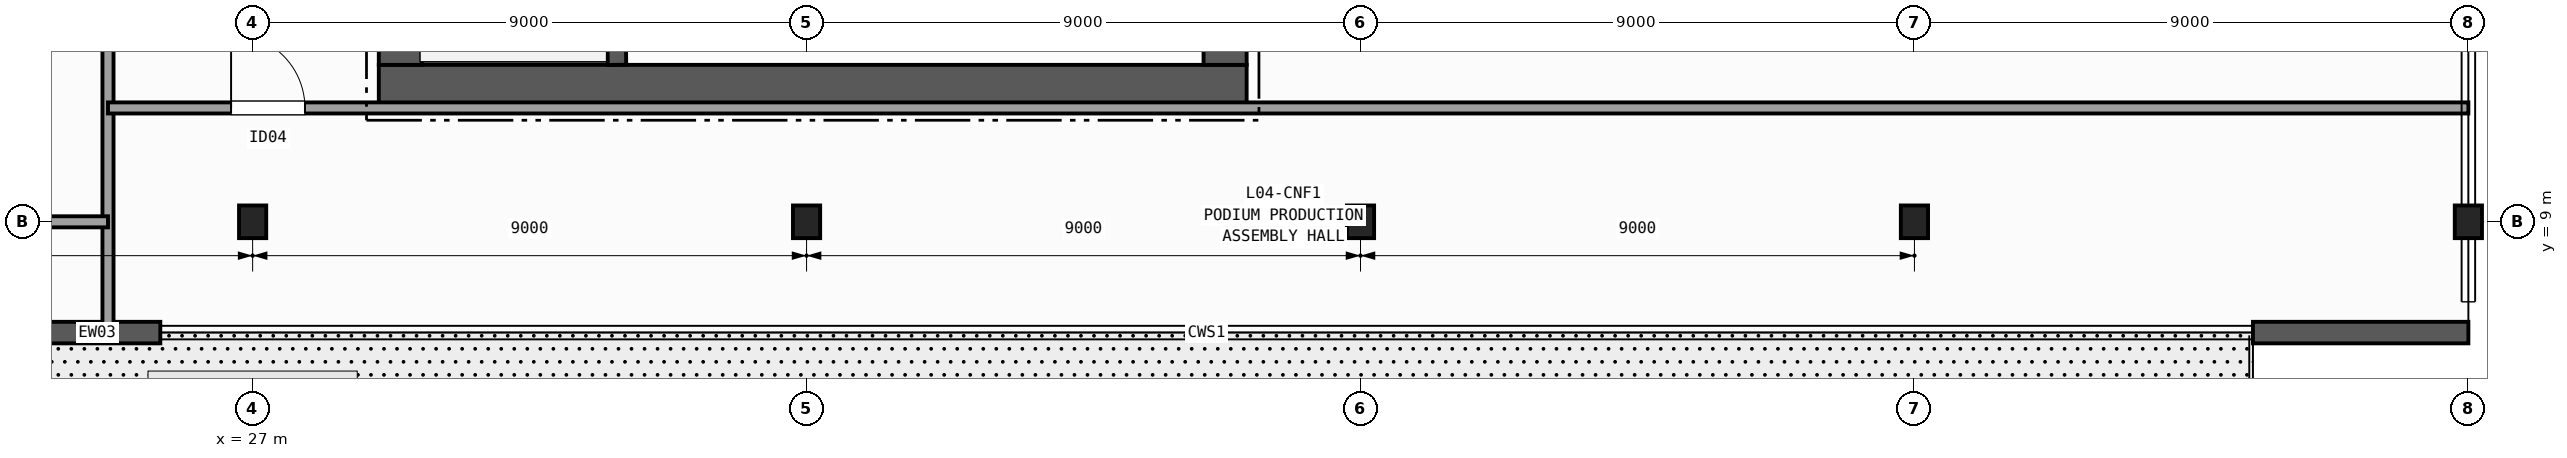
"""IFC4 building model, lengths in metres.
Left out: names, types, materials, properties, quantities, classifications, styles, units other than length and angle.
Written with IfcOpenShell. Run it as: python <this file> out.ifc"""

import sys

from ifc_helpers import new_model, si_unit, direction, frame, frame_2d, origin, origin_2d, place, context, subcontext, project, spatial, rectangle, i_section, extrude, element, fill, save


model = new_model("IFC4")
c1 = context("Model", 3, precision=1e-05, world=origin(), true_north=direction((0.0, 1.0)))
c2 = subcontext(c1, "Body", "Model", "MODEL_VIEW")
j1 = project(units=[si_unit("LENGTHUNIT", "METRE"), si_unit("PLANEANGLEUNIT", "RADIAN")], contexts=[c1])
p1 = place(None, origin())
s1 = spatial("IfcSite", under=j1, at=p1, CompositionType="ELEMENT")
p2 = place(p1, origin())
s2 = spatial("IfcBuilding", under=s1, at=p2, CompositionType="ELEMENT")
p3 = place(p2, frame((0.0, 0.0, 21.2)))
s3 = spatial("IfcBuildingStorey", under=s2, at=p3, CompositionType="ELEMENT", Elevation=21.2)
for number, where, z_axis, x_axis in (
    (1, (27.0, 9.0, 0.0), (0.0, 0.0, 1.0), (1.0, 0.0, 0.0)),
    (2, (36.0, 9.0, 0.0), (0.0, 0.0, 1.0), (1.0, 0.0, 0.0)),
    (3, (45.0, 9.0, 0.0), (0.0, 0.0, 1.0), (1.0, 0.0, 0.0)),
    (4, (54.0, 9.0, 0.0), (0.0, 0.0, 1.0), (1.0, 0.0, 0.0)),
    (5, (63.0, 9.0, 0.0), (0.0, 0.0, 1.0), (1.0, 0.0, 0.0)),
):
    element("IfcColumn", number, at=place(p3, frame(where, z_axis=z_axis, x_axis=x_axis)), inside=s3, PredefinedType="COLUMN", context=c2, shape_type="SweptSolid", body=[
        extrude(i_section(OverallWidth=0.442, OverallDepth=0.531, WebThickness=0.066, FlangeThickness=0.106, FilletRadius=0.015, at=origin_2d()), origin(), (0.0, 0.0, 1.0), 4.8),
    ])
p4 = place(p3, frame((25.5, 7.2, 0.0), z_axis=(0.0, 0.0, 1.0), x_axis=(-1.0, 0.0, 0.0)))
e6 = element("IfcWall", 6, at=p4, inside=s3, PredefinedType="SOLIDWALL", context=c2, shape_type="SweptSolid", body=[
    extrude(rectangle(XDim=5.1, YDim=0.35, at=frame_2d((2.55, 0.0))), origin(), (0.0, 0.0, 1.0), 4.48),
])
p5 = place(p4, frame((2.35, 0.0, 0.0)))
e7 = element("IfcOpeningElement", 7, at=p5, cuts=e6, PredefinedType="OPENING", context=c2, shape_type="SweptSolid", body=[
    extrude(rectangle(XDim=1.3, YDim=2.2, at=frame_2d((0.65, 1.1))), frame((0.0, 0.185, 0.0), z_axis=(0.0, -1.0, 0.0), x_axis=(1.0, 0.0, 0.0)), (0.0, 0.0, 1.0), 0.37),
])
p6 = place(p3, frame((63.0, 7.2, 0.0), z_axis=(0.0, 0.0, 1.0), x_axis=(-1.0, 0.0, 0.0)))
e8 = element("IfcWall", 8, at=p6, inside=s3, PredefinedType="SOLIDWALL", context=c2, shape_type="SweptSolid", body=[
    extrude(rectangle(XDim=3.5, YDim=0.35, at=frame_2d((1.75, 0.0))), origin(), (0.0, 0.0, 1.0), 4.48),
])
p7 = place(p3, frame((29.05, 11.2, 0.0), z_axis=(0.0, 0.0, 1.0), x_axis=(1.0, 0.0, 0.0)))
e9 = element("IfcWall", 9, at=p7, inside=s3, PredefinedType="SHEAR", context=c2, shape_type="SweptSolid", body=[
    extrude(rectangle(XDim=14.1, YDim=0.7, at=frame_2d((7.05, 0.0))), origin(), (0.0, 0.0, 1.0), 4.48),
])
p8 = place(p3, frame((29.4, 24.25, 0.0), z_axis=(0.0, 0.0, 1.0), x_axis=(0.0, -1.0, 0.0)))
e10 = element("IfcWall", 10, at=p8, inside=s3, PredefinedType="SHEAR", context=c2, shape_type="SweptSolid", body=[
    extrude(rectangle(XDim=12.7, YDim=0.7, at=frame_2d((6.35, 0.0))), origin(), (0.0, 0.0, 1.0), 4.48),
])
p9 = place(p8, frame((1.35, 0.0, 0.0)))
e11 = element("IfcOpeningElement", 11, at=p9, cuts=e10, PredefinedType="OPENING", context=c2, shape_type="SweptSolid", body=[
    extrude(rectangle(XDim=1.35, YDim=2.15, at=frame_2d((0.675, 1.075))), frame((0.0, 0.36, 0.0), z_axis=(0.0, -1.0, 0.0), x_axis=(1.0, 0.0, 0.0)), (0.0, 0.0, 1.0), 0.72),
])
p10 = place(p3, frame((42.8, 11.55, 0.0), z_axis=(0.0, 0.0, 1.0), x_axis=(0.0, 1.0, 0.0)))
e12 = element("IfcWall", 12, at=p10, inside=s3, PredefinedType="SHEAR", context=c2, shape_type="SweptSolid", body=[
    extrude(rectangle(XDim=12.7, YDim=0.7, at=frame_2d((6.35, 0.0))), origin(), (0.0, 0.0, 1.0), 4.48),
])
p11 = place(p3, frame((32.92, 11.55, 0.0), z_axis=(0.0, 0.0, 1.0), x_axis=(-0.01331804616, 0.99991131089, 0.0)))
e13 = element("IfcWall", 13, at=p11, inside=s3, PredefinedType="SHEAR", context=c2, shape_type="SweptSolid", body=[
    extrude(rectangle(XDim=9.001, YDim=0.3, at=frame_2d((4.5, 0.0))), origin(), (0.0, 0.0, 1.0), 4.48),
])
p12 = place(p3, frame((24.65, 7.2, 0.0), z_axis=(0.0, 0.0, 1.0), x_axis=(0.0, 1.0, 0.0)))
e14 = element("IfcWall", 14, at=p12, inside=s3, PredefinedType="PARTITIONING", context=c2, shape_type="SweptSolid", body=[
    extrude(rectangle(XDim=21.0, YDim=0.18, at=frame_2d((10.5, 0.0))), origin(), (0.0, 0.0, 1.0), 3.512),
])
p13 = place(p12, frame((6.8, 0.0, 0.0)))
e15 = element("IfcOpeningElement", 15, at=p13, cuts=e14, PredefinedType="OPENING", context=c2, shape_type="SweptSolid", body=[
    extrude(rectangle(XDim=1.4, YDim=2.15, at=frame_2d((0.7, 1.075))), frame((0.0, 0.1, 0.0), z_axis=(0.0, -1.0, 0.0), x_axis=(1.0, 0.0, 0.0)), (0.0, 0.0, 1.0), 0.2),
])
p14 = place(p3, frame((24.65, 10.85, 0.0), z_axis=(0.0, 0.0, 1.0), x_axis=(1.0, 0.0, 0.0)))
e16 = element("IfcWall", 16, at=p14, inside=s3, PredefinedType="PARTITIONING", context=c2, shape_type="SweptSolid", body=[
    extrude(rectangle(XDim=38.35, YDim=0.18, at=frame_2d((19.175, 0.0))), origin(), (0.0, 0.0, 1.0), 3.605),
])
p15 = place(p14, frame((2.0, 0.0, 0.0)))
e17 = element("IfcOpeningElement", 17, at=p15, cuts=e16, PredefinedType="OPENING", context=c2, shape_type="SweptSolid", body=[
    extrude(rectangle(XDim=1.2, YDim=2.15, at=frame_2d((0.6, 1.075))), frame((0.0, 0.1, 0.0), z_axis=(0.0, -1.0, 0.0), x_axis=(1.0, 0.0, 0.0)), (0.0, 0.0, 1.0), 0.2),
])
p16 = place(p3, frame((7.2, 9.0, 0.0), z_axis=(0.0, 0.0, 1.0), x_axis=(1.0, 0.0, 0.0)))
e18 = element("IfcWall", 18, at=p16, inside=s3, PredefinedType="PARTITIONING", context=c2, shape_type="SweptSolid", body=[
    extrude(rectangle(XDim=17.45, YDim=0.18, at=frame_2d((8.725, 0.0))), origin(), (0.0, 0.0, 1.0), 3.533),
])
p17 = place(p16, frame((6.3, 0.0, 0.0)))
e19 = element("IfcOpeningElement", 19, at=p17, cuts=e18, PredefinedType="OPENING", context=c2, shape_type="SweptSolid", body=[
    extrude(rectangle(XDim=0.86, YDim=2.05, at=frame_2d((0.43, 1.025))), frame((0.0, 0.1, 0.0), z_axis=(0.0, -1.0, 0.0), x_axis=(1.0, 0.0, 0.0)), (0.0, 0.0, 1.0), 0.2),
])
p18 = place(p15, origin())
e20 = element("IfcDoor", 20, at=p18, inside=s3, OperationType="SINGLE_SWING_LEFT", PredefinedType="DOOR", context=c2, shape_type="SweptSolid", body=[
    extrude(rectangle(XDim=1.2, YDim=2.15, at=frame_2d((0.6, 1.075))), frame((0.0, 0.025, 0.0), z_axis=(0.0, -1.0, 0.0), x_axis=(1.0, 0.0, 0.0)), (0.0, 0.0, 1.0), 0.05),
])
fill(e17, e20)
save(model, sys.argv[1])
